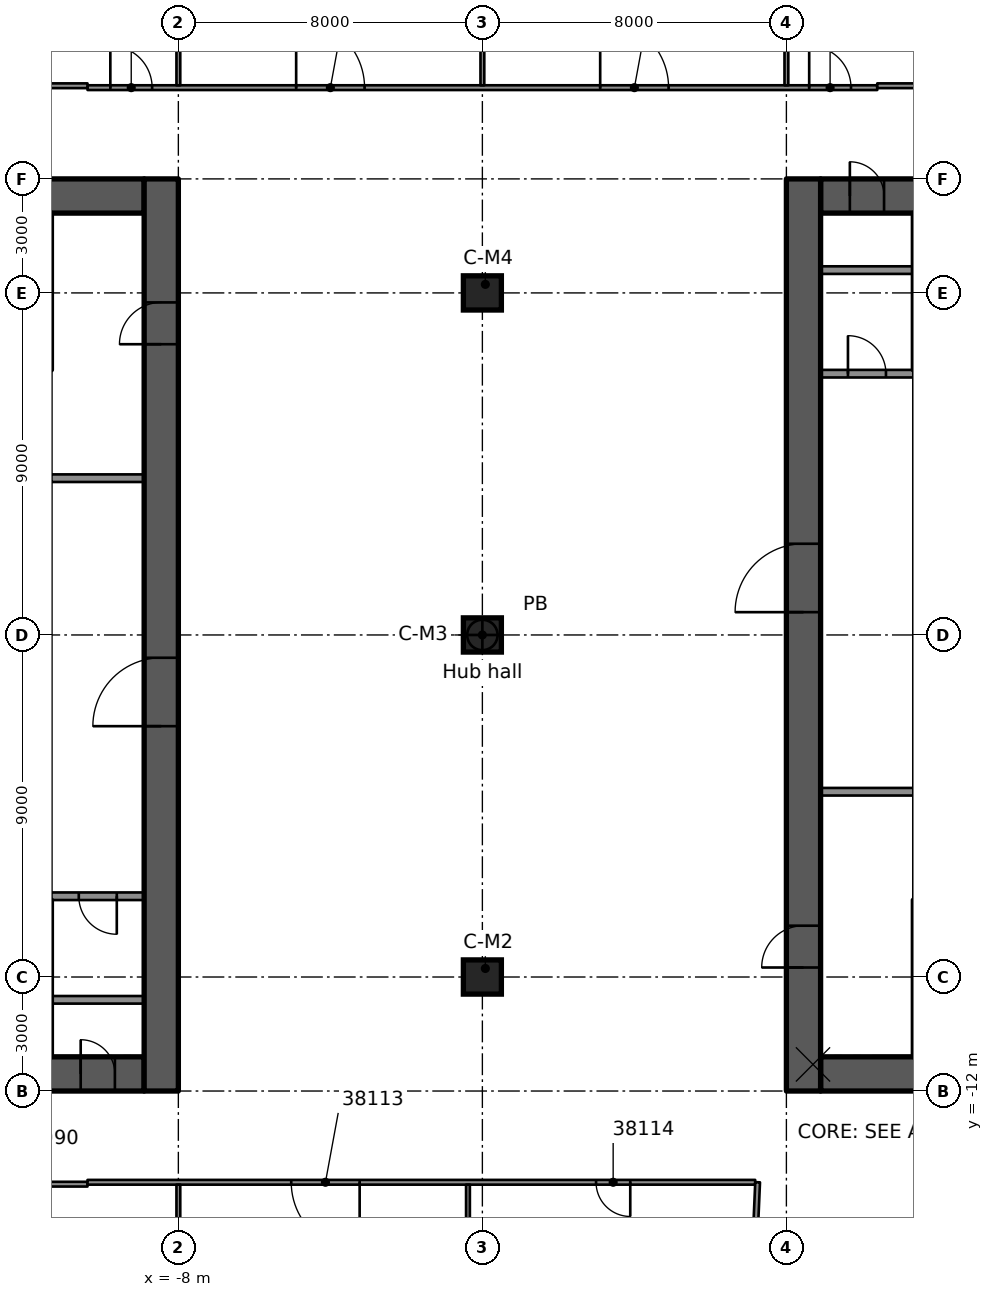
"""IFC4 building model, lengths in metres.
Left out: names, types, materials, properties, quantities, classifications, styles, units other than length and angle.
Written with IfcOpenShell. Run it as: python <this file> out.ifc"""

import sys

from ifc_helpers import new_model, si_unit, direction, frame, frame_2d, origin, origin_2d, place, context, subcontext, project, spatial, rectangle, extrude, element, fill, save


model = new_model("IFC4")
c1 = context("Model", 3, precision=1e-05, world=origin(), true_north=direction((0.0, 1.0)))
c2 = subcontext(c1, "Body", "Model", "MODEL_VIEW")
j1 = project(units=[si_unit("LENGTHUNIT", "METRE"), si_unit("PLANEANGLEUNIT", "RADIAN")], contexts=[c1])
p1 = place(None, origin())
s1 = spatial("IfcSite", under=j1, at=p1, CompositionType="ELEMENT")
p2 = place(p1, origin())
s2 = spatial("IfcBuilding", under=s1, at=p2, CompositionType="ELEMENT")
p3 = place(p2, frame((0.0, 0.0, 188.6)))
s3 = spatial("IfcBuildingStorey", under=s2, at=p3, CompositionType="ELEMENT", Elevation=188.6)
p4 = place(p3, frame((-18.1, 11.55, 0.0), z_axis=(0.0, 0.0, 1.0), x_axis=(1.0, 0.0, 0.0)))
e1 = element("IfcWall", 1, at=p4, inside=s3, PredefinedType="SHEAR", context=c2, shape_type="SweptSolid", body=[
    extrude(rectangle(XDim=9.2, YDim=0.9, at=frame_2d((4.6, 0.0))), origin(), (0.0, 0.0, 1.0), 3.5),
])
p5 = place(p4, frame((5.1, 0.0, 0.0)))
e2 = element("IfcOpeningElement", 2, at=p5, cuts=e1, PredefinedType="OPENING", context=c2, shape_type="SweptSolid", body=[
    extrude(rectangle(XDim=1.1, YDim=2.1, at=frame_2d((0.55, 1.05))), frame((0.0, 0.46, 0.0), z_axis=(0.0, -1.0, 0.0), x_axis=(1.0, 0.0, 0.0)), (0.0, 0.0, 1.0), 0.92),
])
p6 = place(p3, frame((-18.1, -11.55, 0.0), z_axis=(0.0, 0.0, 1.0), x_axis=(1.0, 0.0, 0.0)))
e3 = element("IfcWall", 3, at=p6, inside=s3, PredefinedType="SHEAR", context=c2, shape_type="SweptSolid", body=[
    extrude(rectangle(XDim=9.2, YDim=0.9, at=frame_2d((4.6, 0.0))), origin(), (0.0, 0.0, 1.0), 3.5),
])
p7 = place(p6, frame((5.1, 0.0, 0.0)))
e4 = element("IfcOpeningElement", 4, at=p7, cuts=e3, PredefinedType="OPENING", context=c2, shape_type="SweptSolid", body=[
    extrude(rectangle(XDim=1.1, YDim=2.1, at=frame_2d((0.55, 1.05))), frame((0.0, 0.46, 0.0), z_axis=(0.0, -1.0, 0.0), x_axis=(1.0, 0.0, 0.0)), (0.0, 0.0, 1.0), 0.92),
])
p8 = place(p6, frame((7.53, 0.0, 0.0)))
e5 = element("IfcOpeningElement", 5, at=p8, cuts=e3, PredefinedType="OPENING", context=c2, shape_type="SweptSolid", body=[
    extrude(rectangle(XDim=0.9, YDim=2.1, at=frame_2d((0.45, 1.05))), frame((0.0, 0.46, 0.0), z_axis=(0.0, -1.0, 0.0), x_axis=(1.0, 0.0, 0.0)), (0.0, 0.0, 1.0), 0.92),
])
p9 = place(p3, frame((-8.45, -12.0, 0.0), z_axis=(0.0, 0.0, 1.0), x_axis=(0.0, 1.0, 0.0)))
e6 = element("IfcWall", 6, at=p9, inside=s3, PredefinedType="SHEAR", context=c2, shape_type="SweptSolid", body=[
    extrude(rectangle(XDim=24.0, YDim=0.9, at=frame_2d((12.0, 0.0))), origin(), (0.0, 0.0, 1.0), 3.5),
])
p10 = place(p9, frame((9.6, 0.0, 0.0)))
e7 = element("IfcOpeningElement", 7, at=p10, cuts=e6, PredefinedType="OPENING", context=c2, shape_type="SweptSolid", body=[
    extrude(rectangle(XDim=1.8, YDim=2.1, at=frame_2d((0.9, 1.05))), frame((0.0, 0.46, 0.0), z_axis=(0.0, -1.0, 0.0), x_axis=(1.0, 0.0, 0.0)), (0.0, 0.0, 1.0), 0.92),
])
p11 = place(p9, frame((19.65, 0.0, 0.0)))
e8 = element("IfcOpeningElement", 8, at=p11, cuts=e6, PredefinedType="OPENING", context=c2, shape_type="SweptSolid", body=[
    extrude(rectangle(XDim=1.1, YDim=2.1, at=frame_2d((0.55, 1.05))), frame((0.0, 0.46, 0.0), z_axis=(0.0, -1.0, 0.0), x_axis=(1.0, 0.0, 0.0)), (0.0, 0.0, 1.0), 0.92),
])
p12 = place(p3, frame((8.9, 11.55, 0.0), z_axis=(0.0, 0.0, 1.0), x_axis=(1.0, 0.0, 0.0)))
e9 = element("IfcWall", 9, at=p12, inside=s3, PredefinedType="SHEAR", context=c2, shape_type="SweptSolid", body=[
    extrude(rectangle(XDim=9.2, YDim=0.9, at=frame_2d((4.6, 0.0))), origin(), (0.0, 0.0, 1.0), 3.5),
])
p13 = place(p12, frame((3.0, 0.0, 0.0)))
e10 = element("IfcOpeningElement", 10, at=p13, cuts=e9, PredefinedType="OPENING", context=c2, shape_type="SweptSolid", body=[
    extrude(rectangle(XDim=1.1, YDim=2.1, at=frame_2d((0.55, 1.05))), frame((0.0, 0.46, 0.0), z_axis=(0.0, -1.0, 0.0), x_axis=(1.0, 0.0, 0.0)), (0.0, 0.0, 1.0), 0.92),
])
p14 = place(p12, frame((0.77, 0.0, 0.0)))
e11 = element("IfcOpeningElement", 11, at=p14, cuts=e9, PredefinedType="OPENING", context=c2, shape_type="SweptSolid", body=[
    extrude(rectangle(XDim=0.9, YDim=2.1, at=frame_2d((0.45, 1.05))), frame((0.0, 0.46, 0.0), z_axis=(0.0, -1.0, 0.0), x_axis=(1.0, 0.0, 0.0)), (0.0, 0.0, 1.0), 0.92),
])
p15 = place(p3, frame((8.9, -11.55, 0.0), z_axis=(0.0, 0.0, 1.0), x_axis=(1.0, 0.0, 0.0)))
e12 = element("IfcWall", 12, at=p15, inside=s3, PredefinedType="SHEAR", context=c2, shape_type="SweptSolid", body=[
    extrude(rectangle(XDim=9.2, YDim=0.9, at=frame_2d((4.6, 0.0))), origin(), (0.0, 0.0, 1.0), 3.5),
])
p16 = place(p15, frame((3.0, 0.0, 0.0)))
e13 = element("IfcOpeningElement", 13, at=p16, cuts=e12, PredefinedType="OPENING", context=c2, shape_type="SweptSolid", body=[
    extrude(rectangle(XDim=1.1, YDim=2.1, at=frame_2d((0.55, 1.05))), frame((0.0, 0.46, 0.0), z_axis=(0.0, -1.0, 0.0), x_axis=(1.0, 0.0, 0.0)), (0.0, 0.0, 1.0), 0.92),
])
p17 = place(p3, frame((8.45, -12.0, 0.0), z_axis=(0.0, 0.0, 1.0), x_axis=(0.0, 1.0, 0.0)))
e14 = element("IfcWall", 14, at=p17, inside=s3, PredefinedType="SHEAR", context=c2, shape_type="SweptSolid", body=[
    extrude(rectangle(XDim=24.0, YDim=0.9, at=frame_2d((12.0, 0.0))), origin(), (0.0, 0.0, 1.0), 3.5),
])
p18 = place(p17, frame((12.6, 0.0, 0.0)))
e15 = element("IfcOpeningElement", 15, at=p18, cuts=e14, PredefinedType="OPENING", context=c2, shape_type="SweptSolid", body=[
    extrude(rectangle(XDim=1.8, YDim=2.1, at=frame_2d((0.9, 1.05))), frame((0.0, 0.46, 0.0), z_axis=(0.0, -1.0, 0.0), x_axis=(1.0, 0.0, 0.0)), (0.0, 0.0, 1.0), 0.92),
])
p19 = place(p17, frame((3.25, 0.0, 0.0)))
e16 = element("IfcOpeningElement", 16, at=p19, cuts=e14, PredefinedType="OPENING", context=c2, shape_type="SweptSolid", body=[
    extrude(rectangle(XDim=1.1, YDim=2.1, at=frame_2d((0.55, 1.05))), frame((0.0, 0.46, 0.0), z_axis=(0.0, -1.0, 0.0), x_axis=(1.0, 0.0, 0.0)), (0.0, 0.0, 1.0), 0.92),
])
for number, where, z_axis, x_axis in (
    (17, (0.0, -9.0, 0.0), (0.0, 0.0, 1.0), (1.0, 0.0, 0.0)),
    (18, (0.0, 0.0, 0.0), (0.0, 0.0, 1.0), (1.0, 0.0, 0.0)),
    (19, (0.0, 9.0, 0.0), (0.0, 0.0, 1.0), (1.0, 0.0, 0.0)),
):
    element("IfcColumn", number, at=place(p3, frame(where, z_axis=z_axis, x_axis=x_axis)), inside=s3, PredefinedType="COLUMN", context=c2, shape_type="SweptSolid", body=[
        extrude(rectangle(XDim=1.0, YDim=0.9, at=origin_2d()), origin(), (0.0, 0.0, 1.0), 3.5),
    ])
p20 = place(p3, frame((-8.9, 4.125, 0.0), z_axis=(0.0, 0.0, 1.0), x_axis=(-1.0, 0.0, 0.0)))
e20 = element("IfcWall", 20, at=p20, inside=s3, PredefinedType="PARTITIONING", context=c2, shape_type="SweptSolid", body=[
    extrude(rectangle(XDim=2.44, YDim=0.2, at=frame_2d((1.22, 0.0))), origin(), (0.0, 0.0, 1.0), 3.08),
])
p21 = place(p3, frame((-8.9, -6.875, 0.0), z_axis=(0.0, 0.0, 1.0), x_axis=(-1.0, 0.0, 0.0)))
e21 = element("IfcWall", 21, at=p21, inside=s3, PredefinedType="PARTITIONING", context=c2, shape_type="SweptSolid", body=[
    extrude(rectangle(XDim=2.44, YDim=0.2, at=frame_2d((1.22, 0.0))), origin(), (0.0, 0.0, 1.0), 3.08),
])
p22 = place(p21, frame((0.72, 0.0, 0.0)))
e22 = element("IfcOpeningElement", 22, at=p22, cuts=e21, PredefinedType="OPENING", context=c2, shape_type="SweptSolid", body=[
    extrude(rectangle(XDim=1.0, YDim=2.1, at=frame_2d((0.5, 1.05))), frame((0.0, 0.11, 0.0), z_axis=(0.0, -1.0, 0.0), x_axis=(1.0, 0.0, 0.0)), (0.0, 0.0, 1.0), 0.22),
])
for number, where, z_axis, x_axis in (
    (23, (-8.9, -9.6, 0.0), (0.0, 0.0, 1.0), (-1.0, 0.0, 0.0)),
    (24, (8.9, -4.125, 0.0), (0.0, 0.0, 1.0), (1.0, 0.0, 0.0)),
):
    element("IfcWall", number, at=place(p3, frame(where, z_axis=z_axis, x_axis=x_axis)), inside=s3, PredefinedType="PARTITIONING", context=c2, shape_type="SweptSolid", body=[
        extrude(rectangle(XDim=2.44, YDim=0.2, at=frame_2d((1.22, 0.0))), origin(), (0.0, 0.0, 1.0), 3.08),
    ])
p23 = place(p3, frame((8.9, 6.875, 0.0), z_axis=(0.0, 0.0, 1.0), x_axis=(1.0, 0.0, 0.0)))
e25 = element("IfcWall", 25, at=p23, inside=s3, PredefinedType="PARTITIONING", context=c2, shape_type="SweptSolid", body=[
    extrude(rectangle(XDim=2.44, YDim=0.2, at=frame_2d((1.22, 0.0))), origin(), (0.0, 0.0, 1.0), 3.08),
])
p24 = place(p23, frame((0.72, 0.0, 0.0)))
e26 = element("IfcOpeningElement", 26, at=p24, cuts=e25, PredefinedType="OPENING", context=c2, shape_type="SweptSolid", body=[
    extrude(rectangle(XDim=1.0, YDim=2.1, at=frame_2d((0.5, 1.05))), frame((0.0, 0.11, 0.0), z_axis=(0.0, -1.0, 0.0), x_axis=(1.0, 0.0, 0.0)), (0.0, 0.0, 1.0), 0.22),
])
p25 = place(p3, frame((8.9, 9.6, 0.0), z_axis=(0.0, 0.0, 1.0), x_axis=(1.0, 0.0, 0.0)))
e27 = element("IfcWall", 27, at=p25, inside=s3, PredefinedType="PARTITIONING", context=c2, shape_type="SweptSolid", body=[
    extrude(rectangle(XDim=2.44, YDim=0.2, at=frame_2d((1.22, 0.0))), origin(), (0.0, 0.0, 1.0), 3.08),
])
p26 = place(p3, frame((-11.594, -14.451, 0.0), z_axis=(0.0, 0.0, 1.0), x_axis=(1.0, 0.0, 0.0)))
e28 = element("IfcWall", 28, at=p26, inside=s3, PredefinedType="PARTITIONING", context=c2, shape_type="SweptSolid", body=[
    extrude(rectangle(XDim=1.203, YDim=0.125, at=frame_2d((0.602, 0.0))), origin(), (0.0, 0.0, 1.0), 3.06),
])
p27 = place(p3, frame((7.179, -14.401, 0.0), z_axis=(0.0, 0.0, 1.0), x_axis=(-1.0, 0.0, 0.0)))
e29 = element("IfcWall", 29, at=p27, inside=s3, PredefinedType="PARTITIONING", context=c2, shape_type="SweptSolid", body=[
    extrude(rectangle(XDim=17.569, YDim=0.125, at=frame_2d((8.784, 0.0))), origin(), (0.0, 0.0, 1.0), 3.06),
])
p28 = place(p27, frame((10.408, 0.0, 0.0)))
e30 = element("IfcOpeningElement", 30, at=p28, cuts=e29, PredefinedType="OPENING", context=c2, shape_type="SweptSolid", body=[
    extrude(rectangle(XDim=1.8, YDim=2.1, at=frame_2d((0.9, 1.05))), frame((0.0, 0.073, 0.0), z_axis=(0.0, -1.0, 0.0), x_axis=(1.0, 0.0, 0.0)), (0.0, 0.0, 1.0), 0.145),
])
p29 = place(p27, frame((3.288, 0.0, 0.0)))
e31 = element("IfcOpeningElement", 31, at=p29, cuts=e29, PredefinedType="OPENING", context=c2, shape_type="SweptSolid", body=[
    extrude(rectangle(XDim=0.9, YDim=2.1, at=frame_2d((0.45, 1.05))), frame((0.0, 0.073, 0.0), z_axis=(0.0, -1.0, 0.0), x_axis=(1.0, 0.0, 0.0)), (0.0, 0.0, 1.0), 0.145),
])
p30 = place(p3, frame((-10.39, 14.401, 0.0), z_axis=(0.0, 0.0, 1.0), x_axis=(1.0, 0.0, 0.0)))
e32 = element("IfcWall", 32, at=p30, inside=s3, PredefinedType="PARTITIONING", context=c2, shape_type="SweptSolid", body=[
    extrude(rectangle(XDim=20.781, YDim=0.125, at=frame_2d((10.391, 0.0))), origin(), (0.0, 0.0, 1.0), 3.06),
])
p31 = place(p30, frame((18.99, 0.0, 0.0)))
e33 = element("IfcOpeningElement", 33, at=p31, cuts=e32, PredefinedType="OPENING", context=c2, shape_type="SweptSolid", body=[
    extrude(rectangle(XDim=1.1, YDim=2.1, at=frame_2d((0.55, 1.05))), frame((0.0, 0.073, 0.0), z_axis=(0.0, -1.0, 0.0), x_axis=(1.0, 0.0, 0.0)), (0.0, 0.0, 1.0), 0.145),
])
p32 = place(p30, frame((13.49, 0.0, 0.0)))
e34 = element("IfcOpeningElement", 34, at=p32, cuts=e32, PredefinedType="OPENING", context=c2, shape_type="SweptSolid", body=[
    extrude(rectangle(XDim=1.8, YDim=2.1, at=frame_2d((0.9, 1.05))), frame((0.0, 0.073, 0.0), z_axis=(0.0, -1.0, 0.0), x_axis=(1.0, 0.0, 0.0)), (0.0, 0.0, 1.0), 0.145),
])
p33 = place(p30, frame((5.49, 0.0, 0.0)))
e35 = element("IfcOpeningElement", 35, at=p33, cuts=e32, PredefinedType="OPENING", context=c2, shape_type="SweptSolid", body=[
    extrude(rectangle(XDim=1.8, YDim=2.1, at=frame_2d((0.9, 1.05))), frame((0.0, 0.073, 0.0), z_axis=(0.0, -1.0, 0.0), x_axis=(1.0, 0.0, 0.0)), (0.0, 0.0, 1.0), 0.145),
])
p34 = place(p30, frame((0.6, 0.0, 0.0)))
e36 = element("IfcOpeningElement", 36, at=p34, cuts=e32, PredefinedType="OPENING", context=c2, shape_type="SweptSolid", body=[
    extrude(rectangle(XDim=1.1, YDim=2.1, at=frame_2d((0.55, 1.05))), frame((0.0, 0.073, 0.0), z_axis=(0.0, -1.0, 0.0), x_axis=(1.0, 0.0, 0.0)), (0.0, 0.0, 1.0), 0.145),
])
p35 = place(p3, frame((-21.387, 14.451, 0.0), z_axis=(0.0, 0.0, 1.0), x_axis=(1.0, 0.0, 0.0)))
e37 = element("IfcWall", 37, at=p35, inside=s3, PredefinedType="PARTITIONING", context=c2, shape_type="SweptSolid", body=[
    extrude(rectangle(XDim=10.996, YDim=0.125, at=frame_2d((5.498, 0.0))), origin(), (0.0, 0.0, 1.0), 3.06),
])
p36 = place(p35, frame((1.788, 0.0, 0.0)))
e38 = element("IfcOpeningElement", 38, at=p36, cuts=e37, PredefinedType="OPENING", context=c2, shape_type="SweptSolid", body=[
    extrude(rectangle(XDim=1.8, YDim=2.1, at=frame_2d((0.9, 1.05))), frame((0.0, 0.073, 0.0), z_axis=(0.0, -1.0, 0.0), x_axis=(1.0, 0.0, 0.0)), (0.0, 0.0, 1.0), 0.145),
])
p37 = place(p3, frame((10.391, 14.451, 0.0), z_axis=(0.0, 0.0, 1.0), x_axis=(1.0, 0.0, 0.0)))
e39 = element("IfcWall", 39, at=p37, inside=s3, PredefinedType="PARTITIONING", context=c2, shape_type="SweptSolid", body=[
    extrude(rectangle(XDim=10.996, YDim=0.125, at=frame_2d((5.498, 0.0))), origin(), (0.0, 0.0, 1.0), 3.06),
])
p38 = place(p37, frame((7.38, 0.0, 0.0)))
e40 = element("IfcOpeningElement", 40, at=p38, cuts=e39, PredefinedType="OPENING", context=c2, shape_type="SweptSolid", body=[
    extrude(rectangle(XDim=1.8, YDim=2.1, at=frame_2d((0.9, 1.05))), frame((0.0, 0.073, 0.0), z_axis=(0.0, -1.0, 0.0), x_axis=(1.0, 0.0, 0.0)), (0.0, 0.0, 1.0), 0.145),
])
p39 = place(p3, frame((6.535, -30.711, 0.0), z_axis=(0.0, 0.0, 1.0), x_axis=(0.043365841226, 0.999059259411, 0.0)))
e41 = element("IfcWall", 41, at=p39, inside=s3, PredefinedType="PARTITIONING", context=c2, shape_type="SweptSolid", body=[
    extrude(rectangle(XDim=16.326, YDim=0.125, at=frame_2d((8.163, 0.0))), origin(), (0.0, 0.0, 1.0), 3.06),
])
p40 = place(p3, frame((8.0, 14.463, 0.0), z_axis=(0.0, 0.0, 1.0), x_axis=(0.0, 1.0, 0.0)))
e42 = element("IfcWall", 42, at=p40, inside=s3, PredefinedType="PARTITIONING", context=c2, shape_type="SweptSolid", body=[
    extrude(rectangle(XDim=15.834, YDim=0.1, at=frame_2d((7.917, 0.0))), origin(), (0.0, 0.0, 1.0), 3.06),
])
p41 = place(p3, frame((0.0, 14.463, 0.0), z_axis=(0.0, 0.0, 1.0), x_axis=(0.0, 1.0, 0.0)))
e43 = element("IfcWall", 43, at=p41, inside=s3, PredefinedType="PARTITIONING", context=c2, shape_type="SweptSolid", body=[
    extrude(rectangle(XDim=15.788, YDim=0.1, at=frame_2d((7.894, 0.0))), origin(), (0.0, 0.0, 1.0), 3.06),
])
p42 = place(p3, frame((-0.379, -30.838, 0.0), z_axis=(0.0, 0.0, 1.0), x_axis=(0.0, 1.0, 0.0)))
e44 = element("IfcWall", 44, at=p42, inside=s3, PredefinedType="PARTITIONING", context=c2, shape_type="SweptSolid", body=[
    extrude(rectangle(XDim=16.375, YDim=0.1, at=frame_2d((8.188, 0.0))), origin(), (0.0, 0.0, 1.0), 3.06),
])
p43 = place(p3, frame((-8.0, -29.879, 0.0), z_axis=(0.0, 0.0, 1.0), x_axis=(0.0, 1.0, 0.0)))
e45 = element("IfcWall", 45, at=p43, inside=s3, PredefinedType="PARTITIONING", context=c2, shape_type="SweptSolid", body=[
    extrude(rectangle(XDim=15.416, YDim=0.1, at=frame_2d((7.708, 0.0))), origin(), (0.0, 0.0, 1.0), 3.06),
])
p44 = place(p3, frame((-8.0, 14.463, 0.0), z_axis=(0.0, 0.0, 1.0), x_axis=(0.0, 1.0, 0.0)))
e46 = element("IfcWall", 46, at=p44, inside=s3, PredefinedType="PARTITIONING", context=c2, shape_type="SweptSolid", body=[
    extrude(rectangle(XDim=15.741, YDim=0.1, at=frame_2d((7.871, 0.0))), origin(), (0.0, 0.0, 1.0), 3.06),
])
p45 = place(p10, origin())
e47 = element("IfcDoor", 47, at=p45, inside=s3, OperationType="SINGLE_SWING_LEFT", PredefinedType="DOOR", context=c2, shape_type="SweptSolid", body=[
    extrude(rectangle(XDim=1.8, YDim=2.1, at=frame_2d((0.9, 1.05))), frame((0.0, 0.025, 0.0), z_axis=(0.0, -1.0, 0.0), x_axis=(1.0, 0.0, 0.0)), (0.0, 0.0, 1.0), 0.05),
])
fill(e7, e47)
p46 = place(p11, origin())
e48 = element("IfcDoor", 48, at=p46, inside=s3, OperationType="SINGLE_SWING_RIGHT", PredefinedType="DOOR", context=c2, shape_type="SweptSolid", body=[
    extrude(rectangle(XDim=1.1, YDim=2.1, at=frame_2d((0.55, 1.05))), frame((0.0, 0.025, 0.0), z_axis=(0.0, -1.0, 0.0), x_axis=(1.0, 0.0, 0.0)), (0.0, 0.0, 1.0), 0.05),
])
fill(e8, e48)
p47 = place(p8, origin())
e49 = element("IfcDoor", 49, at=p47, inside=s3, OperationType="SINGLE_SWING_RIGHT", PredefinedType="DOOR", context=c2, shape_type="SweptSolid", body=[
    extrude(rectangle(XDim=0.9, YDim=2.1, at=frame_2d((0.45, 1.05))), frame((0.0, 0.025, 0.0), z_axis=(0.0, -1.0, 0.0), x_axis=(1.0, 0.0, 0.0)), (0.0, 0.0, 1.0), 0.05),
])
fill(e5, e49)
p48 = place(p22, origin())
e50 = element("IfcDoor", 50, at=p48, inside=s3, OperationType="SINGLE_SWING_RIGHT", PredefinedType="DOOR", context=c2, shape_type="SweptSolid", body=[
    extrude(rectangle(XDim=1.0, YDim=2.1, at=frame_2d((0.5, 1.05))), frame((0.0, 0.025, 0.0), z_axis=(0.0, -1.0, 0.0), x_axis=(1.0, 0.0, 0.0)), (0.0, 0.0, 1.0), 0.05),
])
fill(e22, e50)
p49 = place(p18, origin())
e51 = element("IfcDoor", 51, at=p49, inside=s3, OperationType="SINGLE_SWING_RIGHT", PredefinedType="DOOR", context=c2, shape_type="SweptSolid", body=[
    extrude(rectangle(XDim=1.8, YDim=2.1, at=frame_2d((0.9, 1.05))), frame((0.0, 0.025, 0.0), z_axis=(0.0, -1.0, 0.0), x_axis=(1.0, 0.0, 0.0)), (0.0, 0.0, 1.0), 0.05),
])
fill(e15, e51)
p50 = place(p19, origin())
e52 = element("IfcDoor", 52, at=p50, inside=s3, OperationType="SINGLE_SWING_LEFT", PredefinedType="DOOR", context=c2, shape_type="SweptSolid", body=[
    extrude(rectangle(XDim=1.1, YDim=2.1, at=frame_2d((0.55, 1.05))), frame((0.0, 0.025, 0.0), z_axis=(0.0, -1.0, 0.0), x_axis=(1.0, 0.0, 0.0)), (0.0, 0.0, 1.0), 0.05),
])
fill(e16, e52)
p51 = place(p14, origin())
e53 = element("IfcDoor", 53, at=p51, inside=s3, OperationType="SINGLE_SWING_LEFT", PredefinedType="DOOR", context=c2, shape_type="SweptSolid", body=[
    extrude(rectangle(XDim=0.9, YDim=2.1, at=frame_2d((0.45, 1.05))), frame((0.0, 0.025, 0.0), z_axis=(0.0, -1.0, 0.0), x_axis=(1.0, 0.0, 0.0)), (0.0, 0.0, 1.0), 0.05),
])
fill(e11, e53)
p52 = place(p24, origin())
e54 = element("IfcDoor", 54, at=p52, inside=s3, OperationType="SINGLE_SWING_RIGHT", PredefinedType="DOOR", context=c2, shape_type="SweptSolid", body=[
    extrude(rectangle(XDim=1.0, YDim=2.1, at=frame_2d((0.5, 1.05))), frame((0.0, 0.025, 0.0), z_axis=(0.0, -1.0, 0.0), x_axis=(1.0, 0.0, 0.0)), (0.0, 0.0, 1.0), 0.05),
])
fill(e26, e54)
p53 = place(p28, origin())
e55 = element("IfcDoor", 55, at=p53, inside=s3, OperationType="DOUBLE_DOOR_SINGLE_SWING", PredefinedType="DOOR", context=c2, shape_type="SweptSolid", body=[
    extrude(rectangle(XDim=1.8, YDim=2.1, at=frame_2d((0.9, 1.05))), frame((0.0, 0.025, 0.0), z_axis=(0.0, -1.0, 0.0), x_axis=(1.0, 0.0, 0.0)), (0.0, 0.0, 1.0), 0.05),
])
fill(e30, e55)
p54 = place(p29, origin())
e56 = element("IfcDoor", 56, at=p54, inside=s3, OperationType="SINGLE_SWING_LEFT", PredefinedType="DOOR", context=c2, shape_type="SweptSolid", body=[
    extrude(rectangle(XDim=0.9, YDim=2.1, at=frame_2d((0.45, 1.05))), frame((0.0, 0.025, 0.0), z_axis=(0.0, -1.0, 0.0), x_axis=(1.0, 0.0, 0.0)), (0.0, 0.0, 1.0), 0.05),
])
fill(e31, e56)
p55 = place(p31, origin())
e57 = element("IfcDoor", 57, at=p55, inside=s3, OperationType="SINGLE_SWING_RIGHT", PredefinedType="DOOR", context=c2, shape_type="SweptSolid", body=[
    extrude(rectangle(XDim=1.1, YDim=2.1, at=frame_2d((0.55, 1.05))), frame((0.0, 0.025, 0.0), z_axis=(0.0, -1.0, 0.0), x_axis=(1.0, 0.0, 0.0)), (0.0, 0.0, 1.0), 0.05),
])
fill(e33, e57)
p56 = place(p32, origin())
e58 = element("IfcDoor", 58, at=p56, inside=s3, OperationType="DOUBLE_DOOR_SINGLE_SWING", PredefinedType="DOOR", context=c2, shape_type="SweptSolid", body=[
    extrude(rectangle(XDim=1.8, YDim=2.1, at=frame_2d((0.9, 1.05))), frame((0.0, 0.025, 0.0), z_axis=(0.0, -1.0, 0.0), x_axis=(1.0, 0.0, 0.0)), (0.0, 0.0, 1.0), 0.05),
])
fill(e34, e58)
p57 = place(p33, origin())
e59 = element("IfcDoor", 59, at=p57, inside=s3, OperationType="DOUBLE_DOOR_SINGLE_SWING", PredefinedType="DOOR", context=c2, shape_type="SweptSolid", body=[
    extrude(rectangle(XDim=1.8, YDim=2.1, at=frame_2d((0.9, 1.05))), frame((0.0, 0.025, 0.0), z_axis=(0.0, -1.0, 0.0), x_axis=(1.0, 0.0, 0.0)), (0.0, 0.0, 1.0), 0.05),
])
fill(e35, e59)
p58 = place(p34, origin())
e60 = element("IfcDoor", 60, at=p58, inside=s3, OperationType="SINGLE_SWING_LEFT", PredefinedType="DOOR", context=c2, shape_type="SweptSolid", body=[
    extrude(rectangle(XDim=1.1, YDim=2.1, at=frame_2d((0.55, 1.05))), frame((0.0, 0.025, 0.0), z_axis=(0.0, -1.0, 0.0), x_axis=(1.0, 0.0, 0.0)), (0.0, 0.0, 1.0), 0.05),
])
fill(e36, e60)
save(model, sys.argv[1])
